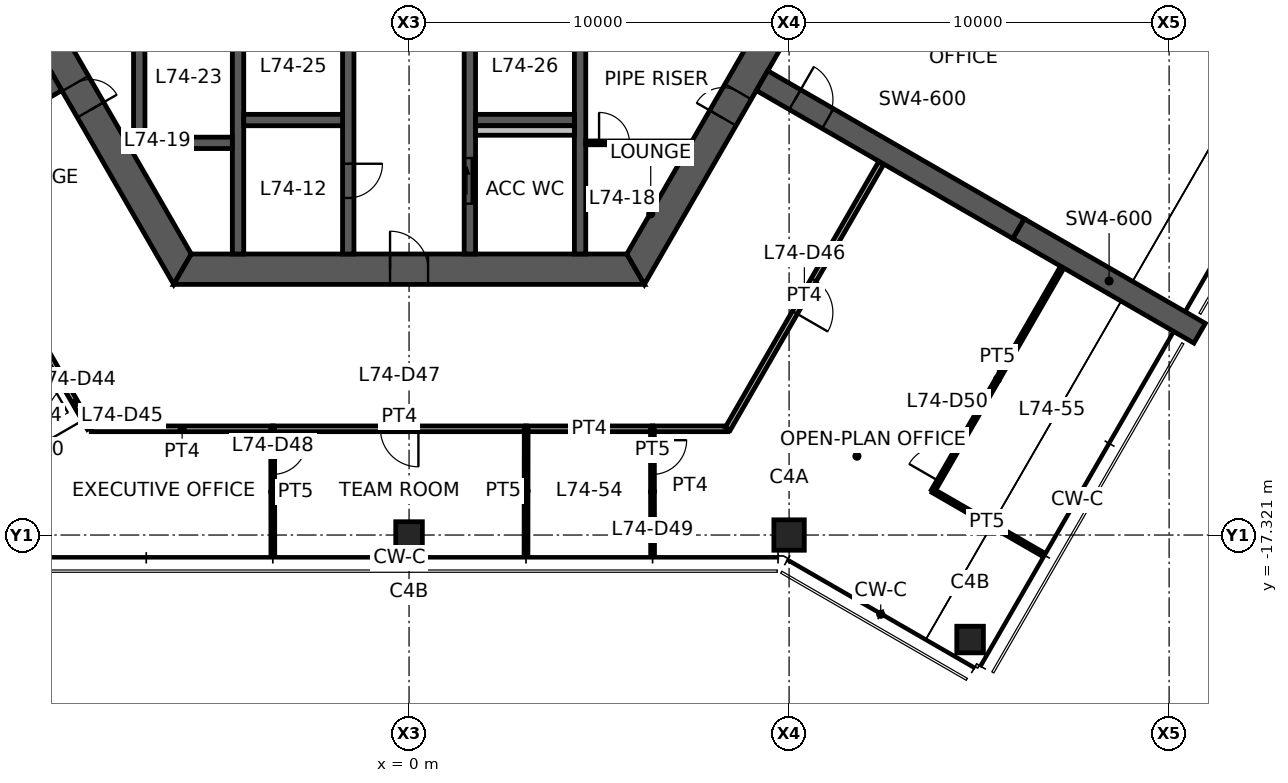
"""IFC4 building model, lengths in metres.
Left out: names, types, materials, properties, quantities, classifications, styles, units other than length and angle.
Written with IfcOpenShell. Run it as: python <this file> out.ifc"""

import sys

from ifc_helpers import new_model, si_unit, direction, frame, frame_2d, origin, origin_2d, place, context, subcontext, project, spatial, polyline, rectangle, hollow_rectangle, outline, extrude, element, fill, save


model = new_model("IFC4")
c1 = context("Model", 3, precision=1e-05, world=origin(), true_north=direction((0.0, 1.0)))
c2 = subcontext(c1, "Body", "Model", "MODEL_VIEW")
j1 = project(units=[si_unit("LENGTHUNIT", "METRE"), si_unit("PLANEANGLEUNIT", "RADIAN")], contexts=[c1])
p1 = place(None, origin())
s1 = spatial("IfcSite", under=j1, at=p1, CompositionType="ELEMENT")
p2 = place(p1, origin())
s2 = spatial("IfcBuilding", under=s1, at=p2, CompositionType="ELEMENT")
p3 = place(p2, frame((0.0, 0.0, 294.7)))
s3 = spatial("IfcBuildingStorey", under=s2, at=p3, CompositionType="ELEMENT", Elevation=294.7)
p4 = place(p3, frame((10.0, -17.321, 0.0), z_axis=(0.0, 0.0, 1.0), x_axis=(1.0, 0.0, 0.0)))
e1 = element("IfcColumn", 1, at=p4, inside=s3, PredefinedType="COLUMN", context=c2, shape_type="SweptSolid", body=[
    extrude(hollow_rectangle(XDim=0.8, YDim=0.8, WallThickness=0.04, at=origin_2d()), origin(), (0.0, 0.0, 1.0), 3.9),
])
for number, where, z_axis, x_axis in (
    (2, (0.0, -17.321, 0.0), (0.0, 0.0, 1.0), (1.0, 0.0, 0.0)),
    (3, (14.763, -20.071, 0.0), (0.0, 0.0, 1.0), (1.0, 0.0, 0.0)),
):
    element("IfcColumn", number, at=place(p3, frame(where, z_axis=z_axis, x_axis=x_axis)), inside=s3, PredefinedType="COLUMN", context=c2, shape_type="SweptSolid", body=[
        extrude(hollow_rectangle(XDim=0.7, YDim=0.7, WallThickness=0.032, at=origin_2d()), origin(), (0.0, 0.0, 1.0), 3.9),
    ])
p5 = place(p3, frame((-11.922, 0.0, 0.0), z_axis=(0.0, 0.0, 1.0), x_axis=(0.500004296715, -0.866022923061, 0.0)))
e4 = element("IfcWall", 4, at=p5, inside=s3, PredefinedType="SHEAR", context=c2, shape_type="SweptSolid", body=[
    extrude(outline(polyline([(-0.231, -0.4), (6.281, -0.4), (7.081, -0.4), (12.153, -0.4), (11.691, 0.4), (7.081, 0.4), (6.281, 0.4), (0.231, 0.4), (-0.231, -0.4)])), origin(), (0.0, 0.0, 1.0), 3.9),
])
p6 = place(p5, frame((6.281, 0.0, 0.0)))
e5 = element("IfcOpeningElement", 5, at=p6, cuts=e4, PredefinedType="OPENING", context=c2, shape_type="SweptSolid", body=[
    extrude(rectangle(XDim=0.8, YDim=2.1, at=frame_2d((0.4, 1.05))), frame((0.0, 0.41, 0.0), z_axis=(0.0, -1.0, 0.0), x_axis=(1.0, 0.0, 0.0)), (0.0, 0.0, 1.0), 0.82),
])
p7 = place(p3, frame((-5.961, -10.325, 0.0), z_axis=(0.0, 0.0, 1.0), x_axis=(1.0, 0.0, 0.0)))
e6 = element("IfcWall", 6, at=p7, inside=s3, PredefinedType="SHEAR", context=c2, shape_type="SweptSolid", body=[
    extrude(outline(polyline([(-0.231, -0.4), (5.461, -0.4), (6.461, -0.4), (12.153, -0.4), (11.691, 0.4), (6.461, 0.4), (5.461, 0.4), (0.231, 0.4), (-0.231, -0.4)])), origin(), (0.0, 0.0, 1.0), 3.9),
])
p8 = place(p7, frame((5.461, 0.0, 0.0)))
e7 = element("IfcOpeningElement", 7, at=p8, cuts=e6, PredefinedType="OPENING", context=c2, shape_type="SweptSolid", body=[
    extrude(rectangle(XDim=1.0, YDim=2.1, at=frame_2d((0.5, 1.05))), frame((0.0, 0.41, 0.0), z_axis=(0.0, -1.0, 0.0), x_axis=(1.0, 0.0, 0.0)), (0.0, 0.0, 1.0), 0.82),
])
p9 = place(p3, frame((5.961, -10.325, 0.0), z_axis=(0.0, 0.0, 1.0), x_axis=(0.500004296715, 0.866022923061, 0.0)))
e8 = element("IfcWall", 8, at=p9, inside=s3, PredefinedType="SHEAR", context=c2, shape_type="SweptSolid", body=[
    extrude(outline(polyline([(-0.231, -0.4), (4.594, -0.4), (5.394, -0.4), (12.153, -0.4), (11.691, 0.4), (5.394, 0.4), (4.594, 0.4), (0.231, 0.4), (-0.231, -0.4)])), origin(), (0.0, 0.0, 1.0), 3.9),
])
p10 = place(p9, frame((4.594, 0.0, 0.0)))
e9 = element("IfcOpeningElement", 9, at=p10, cuts=e8, PredefinedType="OPENING", context=c2, shape_type="SweptSolid", body=[
    extrude(rectangle(XDim=0.8, YDim=2.1, at=frame_2d((0.4, 1.05))), frame((0.0, 0.41, 0.0), z_axis=(0.0, -1.0, 0.0), x_axis=(1.0, 0.0, 0.0)), (0.0, 0.0, 1.0), 0.82),
])
p11 = place(p3, frame((-9.288, -5.363, 0.0), z_axis=(0.0, 0.0, 1.0), x_axis=(-0.866027473358, -0.499996415376, 0.0)))
e10 = element("IfcWall", 10, at=p11, inside=s3, PredefinedType="SHEAR", context=c2, shape_type="SweptSolid", body=[
    extrude(rectangle(XDim=7.045, YDim=0.6, at=frame_2d((3.523, 0.0))), origin(), (0.0, 0.0, 1.0), 3.9),
])
p12 = place(p11, frame((1.0, 0.0, 0.0)))
e11 = element("IfcOpeningElement", 11, at=p12, cuts=e10, PredefinedType="OPENING", context=c2, shape_type="SweptSolid", body=[
    extrude(rectangle(XDim=1.0, YDim=2.1, at=frame_2d((0.5, 1.05))), frame((0.0, 0.31, 0.0), z_axis=(0.0, -1.0, 0.0), x_axis=(1.0, 0.0, 0.0)), (0.0, 0.0, 1.0), 0.62),
])
p13 = place(p3, frame((9.288, -5.363, 0.0), z_axis=(0.0, 0.0, 1.0), x_axis=(0.866031736626, -0.499989031036, 0.0)))
e12 = element("IfcWall", 12, at=p13, inside=s3, PredefinedType="SHEAR", context=c2, shape_type="SweptSolid", body=[
    extrude(rectangle(XDim=7.796, YDim=0.6, at=frame_2d((3.898, 0.0))), origin(), (0.0, 0.0, 1.0), 3.9),
])
p14 = place(p13, frame((1.0, 0.0, 0.0)))
e13 = element("IfcOpeningElement", 13, at=p14, cuts=e12, PredefinedType="OPENING", context=c2, shape_type="SweptSolid", body=[
    extrude(rectangle(XDim=1.0, YDim=2.1, at=frame_2d((0.5, 1.05))), frame((0.0, 0.31, 0.0), z_axis=(0.0, -1.0, 0.0), x_axis=(1.0, 0.0, 0.0)), (0.0, 0.0, 1.0), 0.62),
])
p15 = place(p3, frame((16.039, -9.26, 0.0), z_axis=(0.0, 0.0, 1.0), x_axis=(0.866027397988, -0.499996545922, 0.0)))
e14 = element("IfcWall", 14, at=p15, inside=s3, PredefinedType="SHEAR", context=c2, shape_type="SweptSolid", body=[
    extrude(rectangle(XDim=5.5, YDim=0.6, at=frame_2d((2.75, 0.0))), origin(), (0.0, 0.0, 1.0), 3.9),
])
p16 = place(p3, frame((-1.6, -3.75, 0.0), z_axis=(0.0, 0.0, 1.0), x_axis=(0.0, -1.0, 0.0)))
e15 = element("IfcWall", 15, at=p16, inside=s3, PredefinedType="SHEAR", context=c2, shape_type="SweptSolid", body=[
    extrude(rectangle(XDim=6.175, YDim=0.3, at=frame_2d((3.087, 0.0))), origin(), (0.0, 0.0, 1.0), 3.9),
])
p17 = place(p16, frame((3.8, 0.0, 0.0)))
e16 = element("IfcOpeningElement", 16, at=p17, cuts=e15, PredefinedType="OPENING", context=c2, shape_type="SweptSolid", body=[
    extrude(rectangle(XDim=0.9, YDim=2.1, at=frame_2d((0.45, 1.05))), frame((0.0, 0.16, 0.0), z_axis=(0.0, -1.0, 0.0), x_axis=(1.0, 0.0, 0.0)), (0.0, 0.0, 1.0), 0.32),
])
p18 = place(p3, frame((1.6, -3.75, 0.0), z_axis=(0.0, 0.0, 1.0), x_axis=(0.0, -1.0, 0.0)))
e17 = element("IfcWall", 17, at=p18, inside=s3, PredefinedType="SHEAR", context=c2, shape_type="SweptSolid", body=[
    extrude(rectangle(XDim=6.175, YDim=0.3, at=frame_2d((3.087, 0.0))), origin(), (0.0, 0.0, 1.0), 3.9),
])
p19 = place(p18, frame((3.65, 0.0, 0.0)))
e18 = element("IfcOpeningElement", 18, at=p19, cuts=e17, PredefinedType="OPENING", context=c2, shape_type="SweptSolid", body=[
    extrude(rectangle(XDim=1.2, YDim=2.1, at=frame_2d((0.6, 1.05))), frame((0.0, 0.16, 0.0), z_axis=(0.0, -1.0, 0.0), x_axis=(1.0, 0.0, 0.0)), (0.0, 0.0, 1.0), 0.32),
])
for number, where, z_axis, x_axis in (
    (19, (-4.5, -3.75, 0.0), (0.0, 0.0, 1.0), (0.0, -1.0, 0.0)),
    (20, (4.5, -3.75, 0.0), (0.0, 0.0, 1.0), (0.0, -1.0, 0.0)),
):
    element("IfcWall", number, at=place(p3, frame(where, z_axis=z_axis, x_axis=x_axis)), inside=s3, PredefinedType="SHEAR", context=c2, shape_type="SweptSolid", body=[
        extrude(rectangle(XDim=6.175, YDim=0.3, at=frame_2d((3.087, 0.0))), origin(), (0.0, 0.0, 1.0), 3.9),
    ])
for number, where, z_axis, x_axis in (
    (21, (-4.35, -6.4, 0.0), (0.0, 0.0, 1.0), (1.0, 0.0, 0.0)),
    (22, (1.75, -6.4, 0.0), (0.0, 0.0, 1.0), (1.0, 0.0, 0.0)),
    (23, (-7.25, -7.0, 0.0), (0.0, 0.0, 1.0), (1.0, 0.0, 0.0)),
):
    element("IfcWall", number, at=place(p3, frame(where, z_axis=z_axis, x_axis=x_axis)), inside=s3, PredefinedType="SHEAR", context=c2, shape_type="SweptSolid", body=[
        extrude(rectangle(XDim=2.6, YDim=0.3, at=frame_2d((1.3, 0.0))), origin(), (0.0, 0.0, 1.0), 3.9),
    ])
p20 = place(p3, frame((-7.1, -3.75, 0.0), z_axis=(0.0, 0.0, 1.0), x_axis=(0.0, -1.0, 0.0)))
e24 = element("IfcWall", 24, at=p20, inside=s3, PredefinedType="SHEAR", context=c2, shape_type="SweptSolid", body=[
    extrude(rectangle(XDim=3.1, YDim=0.3, at=frame_2d((1.55, 0.0))), origin(), (0.0, 0.0, 1.0), 3.9),
])
p21 = place(p3, frame((1.75, -6.675, 0.0), z_axis=(0.0, 0.0, 1.0), x_axis=(1.0, 0.0, 0.0)))
e25 = element("IfcWall", 25, at=p21, inside=s3, PredefinedType="PLUMBINGWALL", context=c2, shape_type="SweptSolid", body=[
    extrude(rectangle(XDim=2.6, YDim=0.25, at=frame_2d((1.3, 0.0))), origin(), (0.0, 0.0, 1.0), 3.9),
])
p22 = place(p3, frame((4.65, -7.0, 0.0), z_axis=(0.0, 0.0, 1.0), x_axis=(1.0, 0.0, 0.0)))
e26 = element("IfcWall", 26, at=p22, inside=s3, PredefinedType="PARTITIONING", context=c2, shape_type="SweptSolid", body=[
    extrude(outline(polyline([(0.0, -0.05), (0.35, -0.05), (1.15, -0.05), (2.74, -0.05), (2.769, 0.0), (2.775, 0.05), (1.15, 0.05), (0.35, 0.05), (0.0, 0.05), (0.0, -0.05)])), origin(), (0.0, 0.0, 1.0), 2.95),
])
p23 = place(p22, frame((0.35, 0.0, 0.0)))
e27 = element("IfcOpeningElement", 27, at=p23, cuts=e26, PredefinedType="OPENING", context=c2, shape_type="SweptSolid", body=[
    extrude(rectangle(XDim=0.8, YDim=2.1, at=frame_2d((0.4, 1.05))), frame((0.0, 0.06, 0.0), z_axis=(0.0, -1.0, 0.0), x_axis=(1.0, 0.0, 0.0)), (0.0, 0.0, 1.0), 0.12),
])
p24 = place(p3, frame((-9.161, -13.183, 0.0), z_axis=(0.0, 0.0, 1.0), x_axis=(-0.500032973541, 0.866006365664, 0.0)))
e28 = element("IfcWall", 28, at=p24, inside=s3, PredefinedType="PARTITIONING", context=c2, shape_type="SweptSolid", body=[
    extrude(rectangle(XDim=3.426, YDim=0.15, at=frame_2d((1.713, 0.0))), origin(), (0.0, 0.0, 1.0), 2.95),
])
p25 = place(p3, frame((-8.398, -14.505, 0.0), z_axis=(0.0, 0.0, 1.0), x_axis=(-0.499933379091, 0.866063863968, 0.0)))
e29 = element("IfcWall", 29, at=p25, inside=s3, PredefinedType="PARTITIONING", context=c2, shape_type="SweptSolid", body=[
    extrude(rectangle(XDim=1.536, YDim=0.15, at=frame_2d((0.768, 0.0))), origin(), (0.0, 0.0, 1.0), 2.95),
])
p26 = place(p25, frame((0.268, 0.0, 0.0)))
e30 = element("IfcOpeningElement", 30, at=p26, cuts=e29, PredefinedType="OPENING", context=c2, shape_type="SweptSolid", body=[
    extrude(rectangle(XDim=1.0, YDim=2.1, at=frame_2d((0.5, 1.05))), frame((0.0, 0.085, 0.0), z_axis=(0.0, -1.0, 0.0), x_axis=(1.0, 0.0, 0.0)), (0.0, 0.0, 1.0), 0.17),
])
p27 = place(p3, frame((-9.166, -13.174, 0.0), z_axis=(0.0, 0.0, 1.0), x_axis=(-0.865342122637, -0.501181614577, 0.0)))
e31 = element("IfcWall", 31, at=p27, inside=s3, PredefinedType="PARTITIONING", context=c2, shape_type="SweptSolid", body=[
    extrude(rectangle(XDim=3.311, YDim=0.1, at=frame_2d((1.655, 0.0))), origin(), (0.0, 0.0, 1.0), 2.95),
])
p28 = place(p27, frame((0.3, 0.0, 0.0)))
e32 = element("IfcOpeningElement", 32, at=p28, cuts=e31, PredefinedType="OPENING", context=c2, shape_type="SweptSolid", body=[
    extrude(rectangle(XDim=0.9, YDim=2.1, at=frame_2d((0.45, 1.05))), frame((0.0, 0.06, 0.0), z_axis=(0.0, -1.0, 0.0), x_axis=(1.0, 0.0, 0.0)), (0.0, 0.0, 1.0), 0.12),
])
p29 = place(p3, frame((-3.58, -14.525, 0.0), z_axis=(0.0, 0.0, 1.0), x_axis=(-1.0, 0.0, 0.0)))
e33 = element("IfcWall", 33, at=p29, inside=s3, PredefinedType="PARTITIONING", context=c2, shape_type="SweptSolid", body=[
    extrude(rectangle(XDim=4.783, YDim=0.15, at=frame_2d((2.392, 0.0))), origin(), (0.0, 0.0, 1.0), 2.95),
])
p30 = place(p3, frame((6.413, -14.525, 0.0), z_axis=(0.0, 0.0, 1.0), x_axis=(-1.0, 0.0, 0.0)))
e34 = element("IfcWall", 34, at=p30, inside=s3, PredefinedType="PARTITIONING", context=c2, shape_type="SweptSolid", body=[
    extrude(rectangle(XDim=3.341, YDim=0.15, at=frame_2d((1.67, 0.0))), origin(), (0.0, 0.0, 1.0), 2.95),
])
p31 = place(p3, frame((8.386, -14.525, 0.0), z_axis=(0.0, 0.0, 1.0), x_axis=(-1.0, 0.0, 0.0)))
e35 = element("IfcWall", 35, at=p31, inside=s3, PredefinedType="PARTITIONING", context=c2, shape_type="SweptSolid", body=[
    extrude(rectangle(XDim=1.982, YDim=0.15, at=frame_2d((0.991, 0.0))), origin(), (0.0, 0.0, 1.0), 2.95),
])
p32 = place(p3, frame((12.419, -7.54, 0.0), z_axis=(0.0, 0.0, 1.0), x_axis=(-0.499996687877, -0.866027316031, 0.0)))
e36 = element("IfcWall", 36, at=p32, inside=s3, PredefinedType="PARTITIONING", context=c2, shape_type="SweptSolid", body=[
    extrude(rectangle(XDim=8.066, YDim=0.15, at=frame_2d((4.033, 0.0))), origin(), (0.0, 0.0, 1.0), 2.95),
])
p33 = place(p32, frame((3.533, 0.0, 0.0)))
e37 = element("IfcOpeningElement", 37, at=p33, cuts=e36, PredefinedType="OPENING", context=c2, shape_type="SweptSolid", body=[
    extrude(rectangle(XDim=1.0, YDim=2.1, at=frame_2d((0.5, 1.05))), frame((0.0, 0.085, 0.0), z_axis=(0.0, -1.0, 0.0), x_axis=(1.0, 0.0, 0.0)), (0.0, 0.0, 1.0), 0.17),
])
p34 = place(p3, frame((3.082, -14.525, 0.0), z_axis=(0.0, 0.0, 1.0), x_axis=(-1.0, 0.0, 0.0)))
e38 = element("IfcWall", 38, at=p34, inside=s3, PredefinedType="PARTITIONING", context=c2, shape_type="SweptSolid", body=[
    extrude(rectangle(XDim=6.671, YDim=0.15, at=frame_2d((3.335, 0.0))), origin(), (0.0, 0.0, 1.0), 2.95),
])
p35 = place(p34, frame((2.835, 0.0, 0.0)))
e39 = element("IfcOpeningElement", 39, at=p35, cuts=e38, PredefinedType="OPENING", context=c2, shape_type="SweptSolid", body=[
    extrude(rectangle(XDim=1.0, YDim=2.1, at=frame_2d((0.5, 1.05))), frame((0.0, 0.085, 0.0), z_axis=(0.0, -1.0, 0.0), x_axis=(1.0, 0.0, 0.0)), (0.0, 0.0, 1.0), 0.17),
])
p36 = place(p3, frame((-3.589, -14.525, 0.0), z_axis=(0.0, 0.0, 1.0), x_axis=(0.001401178566, -0.999999018349, 0.0)))
e40 = element("IfcWall", 40, at=p36, inside=s3, PredefinedType="PARTITIONING", context=c2, shape_type="SweptSolid", body=[
    extrude(rectangle(XDim=3.311, YDim=0.1, at=frame_2d((1.655, 0.0))), origin(), (0.0, 0.0, 1.0), 2.95),
])
p37 = place(p36, frame((0.3, 0.0, 0.0)))
e41 = element("IfcOpeningElement", 41, at=p37, cuts=e40, PredefinedType="OPENING", context=c2, shape_type="SweptSolid", body=[
    extrude(rectangle(XDim=0.9, YDim=2.1, at=frame_2d((0.45, 1.05))), frame((0.0, 0.06, 0.0), z_axis=(0.0, -1.0, 0.0), x_axis=(1.0, 0.0, 0.0)), (0.0, 0.0, 1.0), 0.12),
])
p38 = place(p3, frame((6.404, -14.525, 0.0), z_axis=(0.0, 0.0, 1.0), x_axis=(0.001401178566, -0.999999018349, 0.0)))
e42 = element("IfcWall", 42, at=p38, inside=s3, PredefinedType="PARTITIONING", context=c2, shape_type="SweptSolid", body=[
    extrude(rectangle(XDim=3.311, YDim=0.1, at=frame_2d((1.655, 0.0))), origin(), (0.0, 0.0, 1.0), 2.95),
])
p39 = place(p38, frame((0.3, 0.0, 0.0)))
e43 = element("IfcOpeningElement", 43, at=p39, cuts=e42, PredefinedType="OPENING", context=c2, shape_type="SweptSolid", body=[
    extrude(rectangle(XDim=0.9, YDim=2.1, at=frame_2d((0.45, 1.05))), frame((0.0, 0.06, 0.0), z_axis=(0.0, -1.0, 0.0), x_axis=(1.0, 0.0, 0.0)), (0.0, 0.0, 1.0), 0.12),
])
p40 = place(p3, frame((3.077, -17.801, 0.0), z_axis=(0.0, 0.0, 1.0), x_axis=(0.001341580368, 0.999999100081, 0.0)))
e44 = element("IfcWall", 44, at=p40, inside=s3, PredefinedType="PARTITIONING", context=c2, shape_type="SweptSolid", body=[
    extrude(rectangle(XDim=3.276, YDim=0.1, at=frame_2d((1.638, 0.0))), origin(), (0.0, 0.0, 1.0), 2.95),
])
p41 = place(p3, frame((13.788, -16.159, 0.0), z_axis=(0.0, 0.0, 1.0), x_axis=(0.499992600721, 0.866029675718, 0.0)))
e45 = element("IfcWall", 45, at=p41, inside=s3, PredefinedType="PARTITIONING", context=c2, shape_type="SweptSolid", body=[
    extrude(rectangle(XDim=6.78, YDim=0.1, at=frame_2d((3.39, 0.0))), origin(), (0.0, 0.0, 1.0), 2.95),
])
p42 = place(p41, frame((0.3, 0.0, 0.0)))
e46 = element("IfcOpeningElement", 46, at=p42, cuts=e45, PredefinedType="OPENING", context=c2, shape_type="SweptSolid", body=[
    extrude(rectangle(XDim=0.9, YDim=2.1, at=frame_2d((0.45, 1.05))), frame((0.0, 0.06, 0.0), z_axis=(0.0, -1.0, 0.0), x_axis=(1.0, 0.0, 0.0)), (0.0, 0.0, 1.0), 0.12),
])
p43 = place(p3, frame((16.629, -17.799, 0.0), z_axis=(0.0, 0.0, 1.0), x_axis=(-0.866008333849, 0.50002956483, 0.0)))
e47 = element("IfcWall", 47, at=p43, inside=s3, PredefinedType="PARTITIONING", context=c2, shape_type="SweptSolid", body=[
    extrude(rectangle(XDim=3.28, YDim=0.1, at=frame_2d((1.64, 0.0))), origin(), (0.0, 0.0, 1.0), 2.95),
])
p44 = place(p8, origin())
e48 = element("IfcDoor", 48, at=p44, inside=s3, OperationType="SINGLE_SWING_LEFT", PredefinedType="DOOR", context=c2, shape_type="SweptSolid", body=[
    extrude(rectangle(XDim=1.0, YDim=2.1, at=frame_2d((0.5, 1.05))), frame((0.0, 0.025, 0.0), z_axis=(0.0, -1.0, 0.0), x_axis=(1.0, 0.0, 0.0)), (0.0, 0.0, 1.0), 0.05),
])
fill(e7, e48)
p45 = place(p10, origin())
e49 = element("IfcDoor", 49, at=p45, inside=s3, OperationType="SINGLE_SWING_LEFT", PredefinedType="DOOR", context=c2, shape_type="SweptSolid", body=[
    extrude(rectangle(XDim=0.8, YDim=2.1, at=frame_2d((0.4, 1.05))), frame((0.0, 0.025, 0.0), z_axis=(0.0, -1.0, 0.0), x_axis=(1.0, 0.0, 0.0)), (0.0, 0.0, 1.0), 0.05),
])
fill(e9, e49)
p46 = place(p6, origin())
e50 = element("IfcDoor", 50, at=p46, inside=s3, OperationType="SINGLE_SWING_RIGHT", PredefinedType="DOOR", context=c2, shape_type="SweptSolid", body=[
    extrude(rectangle(XDim=0.8, YDim=2.1, at=frame_2d((0.4, 1.05))), frame((0.0, 0.025, 0.0), z_axis=(0.0, -1.0, 0.0), x_axis=(1.0, 0.0, 0.0)), (0.0, 0.0, 1.0), 0.05),
])
fill(e5, e50)
p47 = place(p19, origin())
e51 = element("IfcDoor", 51, at=p47, inside=s3, OperationType="SLIDING_TO_LEFT", PredefinedType="DOOR", context=c2, shape_type="SweptSolid", body=[
    extrude(rectangle(XDim=1.2, YDim=2.1, at=frame_2d((0.6, 1.05))), frame((0.0, 0.025, 0.0), z_axis=(0.0, -1.0, 0.0), x_axis=(1.0, 0.0, 0.0)), (0.0, 0.0, 1.0), 0.05),
])
fill(e18, e51)
p48 = place(p17, origin())
e52 = element("IfcDoor", 52, at=p48, inside=s3, OperationType="SINGLE_SWING_LEFT", PredefinedType="DOOR", context=c2, shape_type="SweptSolid", body=[
    extrude(rectangle(XDim=0.9, YDim=2.1, at=frame_2d((0.45, 1.05))), frame((0.0, 0.025, 0.0), z_axis=(0.0, -1.0, 0.0), x_axis=(1.0, 0.0, 0.0)), (0.0, 0.0, 1.0), 0.05),
])
fill(e16, e52)
p49 = place(p14, origin())
e53 = element("IfcDoor", 53, at=p49, inside=s3, OperationType="SINGLE_SWING_LEFT", PredefinedType="DOOR", context=c2, shape_type="SweptSolid", body=[
    extrude(rectangle(XDim=1.0, YDim=2.1, at=frame_2d((0.5, 1.05))), frame((0.0, 0.025, 0.0), z_axis=(0.0, -1.0, 0.0), x_axis=(1.0, 0.0, 0.0)), (0.0, 0.0, 1.0), 0.05),
])
fill(e13, e53)
p50 = place(p23, origin())
e54 = element("IfcDoor", 54, at=p50, inside=s3, OperationType="SINGLE_SWING_LEFT", PredefinedType="DOOR", context=c2, shape_type="SweptSolid", body=[
    extrude(rectangle(XDim=0.8, YDim=2.1, at=frame_2d((0.4, 1.05))), frame((0.0, 0.025, 0.0), z_axis=(0.0, -1.0, 0.0), x_axis=(1.0, 0.0, 0.0)), (0.0, 0.0, 1.0), 0.05),
])
fill(e27, e54)
p51 = place(p26, origin())
e55 = element("IfcDoor", 55, at=p51, inside=s3, OperationType="SINGLE_SWING_LEFT", PredefinedType="DOOR", context=c2, shape_type="SweptSolid", body=[
    extrude(rectangle(XDim=1.0, YDim=2.1, at=frame_2d((0.5, 1.05))), frame((0.0, 0.025, 0.0), z_axis=(0.0, -1.0, 0.0), x_axis=(1.0, 0.0, 0.0)), (0.0, 0.0, 1.0), 0.05),
])
fill(e30, e55)
p52 = place(p33, origin())
e56 = element("IfcDoor", 56, at=p52, inside=s3, OperationType="SINGLE_SWING_RIGHT", PredefinedType="DOOR", context=c2, shape_type="SweptSolid", body=[
    extrude(rectangle(XDim=1.0, YDim=2.1, at=frame_2d((0.5, 1.05))), frame((0.0, 0.025, 0.0), z_axis=(0.0, -1.0, 0.0), x_axis=(1.0, 0.0, 0.0)), (0.0, 0.0, 1.0), 0.05),
])
fill(e37, e56)
p53 = place(p35, origin())
e57 = element("IfcDoor", 57, at=p53, inside=s3, OperationType="SINGLE_SWING_LEFT", PredefinedType="DOOR", context=c2, shape_type="SweptSolid", body=[
    extrude(rectangle(XDim=1.0, YDim=2.1, at=frame_2d((0.5, 1.05))), frame((0.0, 0.025, 0.0), z_axis=(0.0, -1.0, 0.0), x_axis=(1.0, 0.0, 0.0)), (0.0, 0.0, 1.0), 0.05),
])
fill(e39, e57)
p54 = place(p37, origin())
e58 = element("IfcDoor", 58, at=p54, inside=s3, OperationType="SINGLE_SWING_LEFT", PredefinedType="DOOR", context=c2, shape_type="SweptSolid", body=[
    extrude(rectangle(XDim=0.9, YDim=2.1, at=frame_2d((0.45, 1.05))), frame((0.0, 0.025, 0.0), z_axis=(0.0, -1.0, 0.0), x_axis=(1.0, 0.0, 0.0)), (0.0, 0.0, 1.0), 0.05),
])
fill(e41, e58)
p55 = place(p39, origin())
e59 = element("IfcDoor", 59, at=p55, inside=s3, OperationType="SINGLE_SWING_LEFT", PredefinedType="DOOR", context=c2, shape_type="SweptSolid", body=[
    extrude(rectangle(XDim=0.9, YDim=2.1, at=frame_2d((0.45, 1.05))), frame((0.0, 0.025, 0.0), z_axis=(0.0, -1.0, 0.0), x_axis=(1.0, 0.0, 0.0)), (0.0, 0.0, 1.0), 0.05),
])
fill(e43, e59)
p56 = place(p42, origin())
e60 = element("IfcDoor", 60, at=p56, inside=s3, OperationType="SINGLE_SWING_LEFT", PredefinedType="DOOR", context=c2, shape_type="SweptSolid", body=[
    extrude(rectangle(XDim=0.9, YDim=2.1, at=frame_2d((0.45, 1.05))), frame((0.0, 0.025, 0.0), z_axis=(0.0, -1.0, 0.0), x_axis=(1.0, 0.0, 0.0)), (0.0, 0.0, 1.0), 0.05),
])
fill(e46, e60)
save(model, sys.argv[1])
